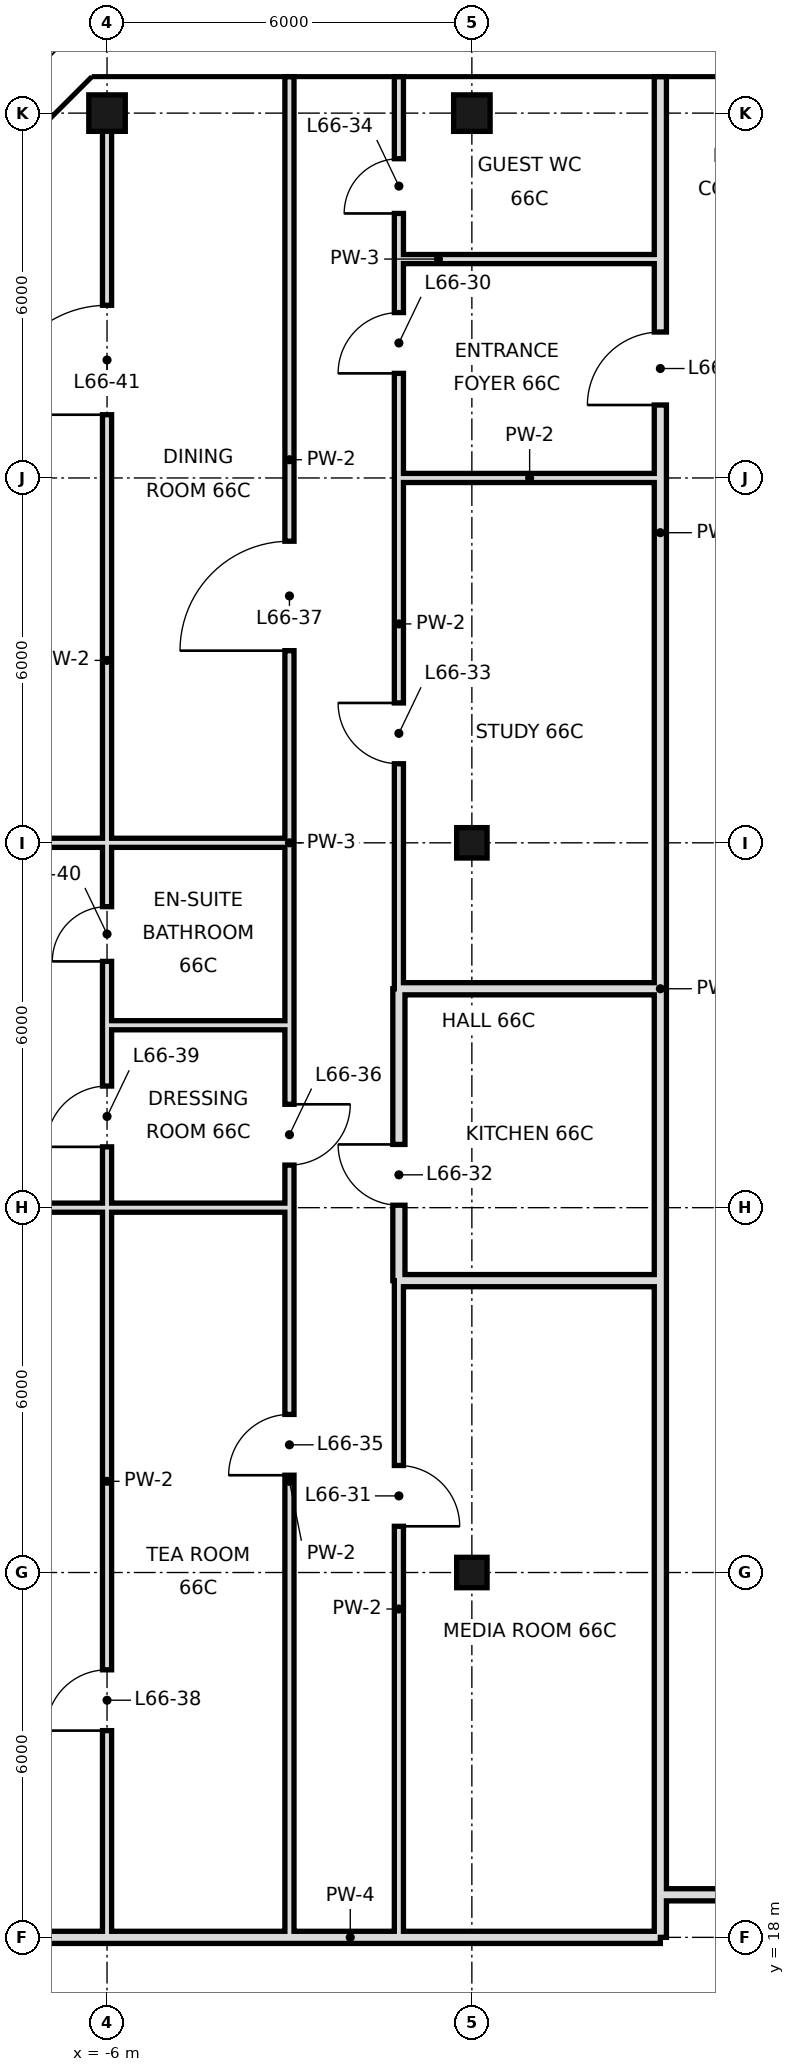
"""IFC4 building model, lengths in metres.
Left out: names, types, materials, properties, quantities, classifications, styles, units other than length and angle.
Written with IfcOpenShell. Run it as: python <this file> out.ifc"""

import sys

from ifc_helpers import new_model, si_unit, direction, frame, frame_2d, origin, origin_2d, place, context, subcontext, project, spatial, rectangle, hollow_rectangle, extrude, element, fill, save


model = new_model("IFC4")
c1 = context("Model", 3, precision=1e-05, world=origin(), true_north=direction((0.0, 1.0)))
c2 = subcontext(c1, "Body", "Model", "MODEL_VIEW")
j1 = project(units=[si_unit("LENGTHUNIT", "METRE"), si_unit("PLANEANGLEUNIT", "RADIAN")], contexts=[c1])
p1 = place(None, origin())
s1 = spatial("IfcSite", under=j1, at=p1, CompositionType="ELEMENT")
p2 = place(p1, origin())
s2 = spatial("IfcBuilding", under=s1, at=p2, CompositionType="ELEMENT")
p3 = place(p2, frame((0.0, 0.0, 277.4)))
s3 = spatial("IfcBuildingStorey", under=s2, at=p3, CompositionType="ELEMENT", Elevation=277.4)
p4 = place(p3, frame((-6.0, 48.0, 0.0), z_axis=(0.0, 0.0, 1.0), x_axis=(1.0, 0.0, 0.0)))
e1 = element("IfcColumn", 1, at=p4, inside=s3, PredefinedType="COLUMN", context=c2, shape_type="SweptSolid", body=[
    extrude(hollow_rectangle(XDim=0.6, YDim=0.6, WallThickness=0.028, at=origin_2d()), origin(), (0.0, 0.0, 1.0), 4.4),
])
for number, where, z_axis, x_axis in (
    (2, (0.0, 24.0, 0.0), (0.0, 0.0, 1.0), (1.0, 0.0, 0.0)),
    (3, (0.0, 36.0, 0.0), (0.0, 0.0, 1.0), (1.0, 0.0, 0.0)),
):
    element("IfcColumn", number, at=place(p3, frame(where, z_axis=z_axis, x_axis=x_axis)), inside=s3, PredefinedType="COLUMN", context=c2, shape_type="SweptSolid", body=[
        extrude(hollow_rectangle(XDim=0.5, YDim=0.5, WallThickness=0.025, at=origin_2d()), origin(), (0.0, 0.0, 1.0), 4.4),
    ])
p5 = place(p3, frame((0.0, 48.0, 0.0), z_axis=(0.0, 0.0, 1.0), x_axis=(1.0, 0.0, 0.0)))
e4 = element("IfcColumn", 4, at=p5, inside=s3, PredefinedType="COLUMN", context=c2, shape_type="SweptSolid", body=[
    extrude(hollow_rectangle(XDim=0.6, YDim=0.6, WallThickness=0.028, at=origin_2d()), origin(), (0.0, 0.0, 1.0), 4.4),
])
p6 = place(p3, frame((-1.2, 28.8, 0.0), z_axis=(0.0, 0.0, 1.0), x_axis=(0.0, 1.0, 0.0)))
e5 = element("IfcWall", 5, at=p6, inside=s3, PredefinedType="SOLIDWALL", context=c2, shape_type="SweptSolid", body=[
    extrude(rectangle(XDim=4.8, YDim=0.2, at=frame_2d((2.4, 0.0))), origin(), (0.0, 0.0, 1.0), 3.4),
])
p7 = place(p6, frame((1.24, 0.0, 0.0)))
e6 = element("IfcOpeningElement", 6, at=p7, cuts=e5, PredefinedType="OPENING", context=c2, shape_type="SweptSolid", body=[
    extrude(rectangle(XDim=1.0, YDim=2.4, at=frame_2d((0.5, 1.2))), frame((0.0, 0.11, 0.0), z_axis=(0.0, -1.0, 0.0), x_axis=(1.0, 0.0, 0.0)), (0.0, 0.0, 1.0), 0.22),
])
p8 = place(p3, frame((-1.2, 18.0, 0.0), z_axis=(0.0, 0.0, 1.0), x_axis=(0.0, 1.0, 0.0)))
e7 = element("IfcWall", 7, at=p8, inside=s3, PredefinedType="PARTITIONING", context=c2, shape_type="SweptSolid", body=[
    extrude(rectangle(XDim=10.8, YDim=0.15, at=frame_2d((5.4, 0.0))), origin(), (0.0, 0.0, 1.0), 4.1),
])
p9 = place(p8, frame((6.76, 0.0, 0.0)))
e8 = element("IfcOpeningElement", 8, at=p9, cuts=e7, PredefinedType="OPENING", context=c2, shape_type="SweptSolid", body=[
    extrude(rectangle(XDim=1.0, YDim=2.4, at=frame_2d((0.5, 1.2))), frame((0.0, 0.085, 0.0), z_axis=(0.0, -1.0, 0.0), x_axis=(1.0, 0.0, 0.0)), (0.0, 0.0, 1.0), 0.17),
])
p10 = place(p3, frame((-1.2, 33.6, 0.0), z_axis=(0.0, 0.0, 1.0), x_axis=(0.0, 1.0, 0.0)))
e9 = element("IfcWall", 9, at=p10, inside=s3, PredefinedType="PARTITIONING", context=c2, shape_type="SweptSolid", body=[
    extrude(rectangle(XDim=12.0, YDim=0.15, at=frame_2d((6.0, 0.0))), origin(), (0.0, 0.0, 1.0), 4.1),
])
p11 = place(p10, frame((10.12, 0.0, 0.0)))
e10 = element("IfcOpeningElement", 10, at=p11, cuts=e9, PredefinedType="OPENING", context=c2, shape_type="SweptSolid", body=[
    extrude(rectangle(XDim=1.0, YDim=2.4, at=frame_2d((0.5, 1.2))), frame((0.0, 0.085, 0.0), z_axis=(0.0, -1.0, 0.0), x_axis=(1.0, 0.0, 0.0)), (0.0, 0.0, 1.0), 0.17),
])
p12 = place(p10, frame((3.7, 0.0, 0.0)))
e11 = element("IfcOpeningElement", 11, at=p12, cuts=e9, PredefinedType="OPENING", context=c2, shape_type="SweptSolid", body=[
    extrude(rectangle(XDim=1.0, YDim=2.4, at=frame_2d((0.5, 1.2))), frame((0.0, 0.085, 0.0), z_axis=(0.0, -1.0, 0.0), x_axis=(1.0, 0.0, 0.0)), (0.0, 0.0, 1.0), 0.17),
])
p13 = place(p3, frame((-1.2, 45.6, 0.0), z_axis=(0.0, 0.0, 1.0), x_axis=(0.0, 1.0, 0.0)))
e12 = element("IfcWall", 12, at=p13, inside=s3, PredefinedType="PARTITIONING", context=c2, shape_type="SweptSolid", body=[
    extrude(rectangle(XDim=3.0, YDim=0.15, at=frame_2d((1.5, 0.0))), origin(), (0.0, 0.0, 1.0), 4.1),
])
p14 = place(p13, frame((0.75, 0.0, 0.0)))
e13 = element("IfcOpeningElement", 13, at=p14, cuts=e12, PredefinedType="OPENING", context=c2, shape_type="SweptSolid", body=[
    extrude(rectangle(XDim=0.9, YDim=2.4, at=frame_2d((0.45, 1.2))), frame((0.0, 0.085, 0.0), z_axis=(0.0, -1.0, 0.0), x_axis=(1.0, 0.0, 0.0)), (0.0, 0.0, 1.0), 0.17),
])
p15 = place(p3, frame((-3.0, 18.0, 0.0), z_axis=(0.0, 0.0, 1.0), x_axis=(0.0, 1.0, 0.0)))
e14 = element("IfcWall", 14, at=p15, inside=s3, PredefinedType="PARTITIONING", context=c2, shape_type="SweptSolid", body=[
    extrude(rectangle(XDim=15.0, YDim=0.15, at=frame_2d((7.5, 0.0))), origin(), (0.0, 0.0, 1.0), 4.1),
])
p16 = place(p15, frame((7.6, 0.0, 0.0)))
e15 = element("IfcOpeningElement", 15, at=p16, cuts=e14, PredefinedType="OPENING", context=c2, shape_type="SweptSolid", body=[
    extrude(rectangle(XDim=1.0, YDim=2.4, at=frame_2d((0.5, 1.2))), frame((0.0, 0.085, 0.0), z_axis=(0.0, -1.0, 0.0), x_axis=(1.0, 0.0, 0.0)), (0.0, 0.0, 1.0), 0.17),
])
p17 = place(p15, frame((12.7, 0.0, 0.0)))
e16 = element("IfcOpeningElement", 16, at=p17, cuts=e14, PredefinedType="OPENING", context=c2, shape_type="SweptSolid", body=[
    extrude(rectangle(XDim=1.0, YDim=2.4, at=frame_2d((0.5, 1.2))), frame((0.0, 0.085, 0.0), z_axis=(0.0, -1.0, 0.0), x_axis=(1.0, 0.0, 0.0)), (0.0, 0.0, 1.0), 0.17),
])
p18 = place(p3, frame((-3.0, 36.0, 0.0), z_axis=(0.0, 0.0, 1.0), x_axis=(0.0, 1.0, 0.0)))
e17 = element("IfcWall", 17, at=p18, inside=s3, PredefinedType="PARTITIONING", context=c2, shape_type="SweptSolid", body=[
    extrude(rectangle(XDim=12.6, YDim=0.15, at=frame_2d((6.3, 0.0))), origin(), (0.0, 0.0, 1.0), 4.1),
])
p19 = place(p18, frame((3.16, 0.0, 0.0)))
e18 = element("IfcOpeningElement", 18, at=p19, cuts=e17, PredefinedType="OPENING", context=c2, shape_type="SweptSolid", body=[
    extrude(rectangle(XDim=1.8, YDim=2.4, at=frame_2d((0.9, 1.2))), frame((0.0, 0.085, 0.0), z_axis=(0.0, -1.0, 0.0), x_axis=(1.0, 0.0, 0.0)), (0.0, 0.0, 1.0), 0.17),
])
p20 = place(p3, frame((-3.0, 33.0, 0.0), z_axis=(0.0, 0.0, 1.0), x_axis=(0.0, 1.0, 0.0)))
e19 = element("IfcWall", 19, at=p20, inside=s3, PredefinedType="PARTITIONING", context=c2, shape_type="SweptSolid", body=[
    extrude(rectangle(XDim=3.0, YDim=0.15, at=frame_2d((1.5, 0.0))), origin(), (0.0, 0.0, 1.0), 4.1),
])
p21 = place(p3, frame((-6.0, 18.0, 0.0), z_axis=(0.0, 0.0, 1.0), x_axis=(0.0, 1.0, 0.0)))
e20 = element("IfcWall", 20, at=p21, inside=s3, PredefinedType="PARTITIONING", context=c2, shape_type="SweptSolid", body=[
    extrude(rectangle(XDim=15.0, YDim=0.15, at=frame_2d((7.5, 0.0))), origin(), (0.0, 0.0, 1.0), 4.1),
])
p22 = place(p21, frame((3.4, 0.0, 0.0)))
e21 = element("IfcOpeningElement", 21, at=p22, cuts=e20, PredefinedType="OPENING", context=c2, shape_type="SweptSolid", body=[
    extrude(rectangle(XDim=1.0, YDim=2.4, at=frame_2d((0.5, 1.2))), frame((0.0, 0.085, 0.0), z_axis=(0.0, -1.0, 0.0), x_axis=(1.0, 0.0, 0.0)), (0.0, 0.0, 1.0), 0.17),
])
p23 = place(p21, frame((13.0, 0.0, 0.0)))
e22 = element("IfcOpeningElement", 22, at=p23, cuts=e20, PredefinedType="OPENING", context=c2, shape_type="SweptSolid", body=[
    extrude(rectangle(XDim=1.0, YDim=2.4, at=frame_2d((0.5, 1.2))), frame((0.0, 0.085, 0.0), z_axis=(0.0, -1.0, 0.0), x_axis=(1.0, 0.0, 0.0)), (0.0, 0.0, 1.0), 0.17),
])
p24 = place(p3, frame((-6.0, 36.0, 0.0), z_axis=(0.0, 0.0, 1.0), x_axis=(0.0, 1.0, 0.0)))
e23 = element("IfcWall", 23, at=p24, inside=s3, PredefinedType="PARTITIONING", context=c2, shape_type="SweptSolid", body=[
    extrude(rectangle(XDim=12.0, YDim=0.15, at=frame_2d((6.0, 0.0))), origin(), (0.0, 0.0, 1.0), 4.1),
])
p25 = place(p24, frame((7.04, 0.0, 0.0)))
e24 = element("IfcOpeningElement", 24, at=p25, cuts=e23, PredefinedType="OPENING", context=c2, shape_type="SweptSolid", body=[
    extrude(rectangle(XDim=1.8, YDim=2.4, at=frame_2d((0.9, 1.2))), frame((0.0, 0.085, 0.0), z_axis=(0.0, -1.0, 0.0), x_axis=(1.0, 0.0, 0.0)), (0.0, 0.0, 1.0), 0.17),
])
p26 = place(p3, frame((-6.0, 33.0, 0.0), z_axis=(0.0, 0.0, 1.0), x_axis=(0.0, 1.0, 0.0)))
e25 = element("IfcWall", 25, at=p26, inside=s3, PredefinedType="PARTITIONING", context=c2, shape_type="SweptSolid", body=[
    extrude(rectangle(XDim=3.0, YDim=0.15, at=frame_2d((1.5, 0.0))), origin(), (0.0, 0.0, 1.0), 4.1),
])
p27 = place(p26, frame((1.05, 0.0, 0.0)))
e26 = element("IfcOpeningElement", 26, at=p27, cuts=e25, PredefinedType="OPENING", context=c2, shape_type="SweptSolid", body=[
    extrude(rectangle(XDim=0.9, YDim=2.4, at=frame_2d((0.45, 1.2))), frame((0.0, 0.085, 0.0), z_axis=(0.0, -1.0, 0.0), x_axis=(1.0, 0.0, 0.0)), (0.0, 0.0, 1.0), 0.17),
])
p28 = place(p3, frame((3.1, 18.7, 0.0), z_axis=(0.0, 0.0, 1.0), x_axis=(0.0, 1.0, 0.0)))
e27 = element("IfcWall", 27, at=p28, inside=s3, PredefinedType="SOLIDWALL", context=c2, shape_type="SweptSolid", body=[
    extrude(rectangle(XDim=10.1, YDim=0.2, at=frame_2d((5.05, 0.0))), origin(), (0.0, 0.0, 1.0), 4.1),
])
p29 = place(p3, frame((3.1, 33.6, 0.0), z_axis=(0.0, 0.0, 1.0), x_axis=(0.0, 1.0, 0.0)))
e28 = element("IfcWall", 28, at=p29, inside=s3, PredefinedType="SOLIDWALL", context=c2, shape_type="SweptSolid", body=[
    extrude(rectangle(XDim=15.0, YDim=0.2, at=frame_2d((7.5, 0.0))), origin(), (0.0, 0.0, 1.0), 3.4),
])
p30 = place(p29, frame((9.6, 0.0, 0.0)))
e29 = element("IfcOpeningElement", 29, at=p30, cuts=e28, PredefinedType="OPENING", context=c2, shape_type="SweptSolid", body=[
    extrude(rectangle(XDim=1.2, YDim=2.4, at=frame_2d((0.6, 1.2))), frame((0.0, 0.11, 0.0), z_axis=(0.0, -1.0, 0.0), x_axis=(1.0, 0.0, 0.0)), (0.0, 0.0, 1.0), 0.22),
])
p31 = place(p3, frame((3.1, 28.8, 0.0), z_axis=(0.0, 0.0, 1.0), x_axis=(0.0, 1.0, 0.0)))
e30 = element("IfcWall", 30, at=p31, inside=s3, PredefinedType="SOLIDWALL", context=c2, shape_type="SweptSolid", body=[
    extrude(rectangle(XDim=4.8, YDim=0.2, at=frame_2d((2.4, 0.0))), origin(), (0.0, 0.0, 1.0), 3.65),
])
p32 = place(p3, frame((3.1, 18.0, 0.0), z_axis=(0.0, 0.0, 1.0), x_axis=(0.0, 1.0, 0.0)))
e31 = element("IfcWall", 31, at=p32, inside=s3, PredefinedType="SOLIDWALL", context=c2, shape_type="SweptSolid", body=[
    extrude(rectangle(XDim=0.7, YDim=0.2, at=frame_2d((0.35, 0.0))), origin(), (0.0, 0.0, 1.0), 3.65),
])
p33 = place(p3, frame((-7.8, 18.0, 0.0), z_axis=(0.0, 0.0, 1.0), x_axis=(1.0, 0.0, 0.0)))
e32 = element("IfcWall", 32, at=p33, inside=s3, PredefinedType="SOLIDWALL", context=c2, shape_type="SweptSolid", body=[
    extrude(rectangle(XDim=10.9, YDim=0.2, at=frame_2d((5.45, 0.0))), origin(), (0.0, 0.0, 1.0), 3.4),
])
p34 = place(p3, frame((3.1, 18.7, 0.0), z_axis=(0.0, 0.0, 1.0), x_axis=(1.0, 0.0, 0.0)))
e33 = element("IfcWall", 33, at=p34, inside=s3, PredefinedType="SOLIDWALL", context=c2, shape_type="SweptSolid", body=[
    extrude(rectangle(XDim=17.3, YDim=0.2, at=frame_2d((8.65, 0.0))), origin(), (0.0, 0.0, 1.0), 3.4),
])
p35 = place(p34, frame((12.16, 0.0, 0.0)))
e34 = element("IfcOpeningElement", 34, at=p35, cuts=e33, PredefinedType="OPENING", context=c2, shape_type="SweptSolid", body=[
    extrude(rectangle(XDim=1.2, YDim=2.4, at=frame_2d((0.6, 1.2))), frame((0.0, 0.11, 0.0), z_axis=(0.0, -1.0, 0.0), x_axis=(1.0, 0.0, 0.0)), (0.0, 0.0, 1.0), 0.22),
])
p36 = place(p3, frame((-1.2, 28.8, 0.0), z_axis=(0.0, 0.0, 1.0), x_axis=(1.0, 0.0, 0.0)))
e35 = element("IfcWall", 35, at=p36, inside=s3, PredefinedType="SOLIDWALL", context=c2, shape_type="SweptSolid", body=[
    extrude(rectangle(XDim=4.3, YDim=0.2, at=frame_2d((2.15, 0.0))), origin(), (0.0, 0.0, 1.0), 3.4),
])
p37 = place(p3, frame((-12.6, 30.0, 0.0), z_axis=(0.0, 0.0, 1.0), x_axis=(1.0, 0.0, 0.0)))
e36 = element("IfcWall", 36, at=p37, inside=s3, PredefinedType="PARTITIONING", context=c2, shape_type="SweptSolid", body=[
    extrude(rectangle(XDim=9.6, YDim=0.15, at=frame_2d((4.8, 0.0))), origin(), (0.0, 0.0, 1.0), 3.4),
])
p38 = place(p3, frame((-6.0, 33.0, 0.0), z_axis=(0.0, 0.0, 1.0), x_axis=(1.0, 0.0, 0.0)))
e37 = element("IfcWall", 37, at=p38, inside=s3, PredefinedType="PARTITIONING", context=c2, shape_type="SweptSolid", body=[
    extrude(rectangle(XDim=3.0, YDim=0.15, at=frame_2d((1.5, 0.0))), origin(), (0.0, 0.0, 1.0), 4.1),
])
p39 = place(p3, frame((-1.2, 33.6, 0.0), z_axis=(0.0, 0.0, 1.0), x_axis=(1.0, 0.0, 0.0)))
e38 = element("IfcWall", 38, at=p39, inside=s3, PredefinedType="SOLIDWALL", context=c2, shape_type="SweptSolid", body=[
    extrude(rectangle(XDim=4.3, YDim=0.2, at=frame_2d((2.15, 0.0))), origin(), (0.0, 0.0, 1.0), 3.4),
])
p40 = place(p3, frame((-12.0, 36.0, 0.0), z_axis=(0.0, 0.0, 1.0), x_axis=(1.0, 0.0, 0.0)))
e39 = element("IfcWall", 39, at=p40, inside=s3, PredefinedType="PARTITIONING", context=c2, shape_type="SweptSolid", body=[
    extrude(rectangle(XDim=6.0, YDim=0.15, at=frame_2d((3.0, 0.0))), origin(), (0.0, 0.0, 1.0), 3.4),
])
p41 = place(p3, frame((-6.0, 36.0, 0.0), z_axis=(0.0, 0.0, 1.0), x_axis=(1.0, 0.0, 0.0)))
e40 = element("IfcWall", 40, at=p41, inside=s3, PredefinedType="PARTITIONING", context=c2, shape_type="SweptSolid", body=[
    extrude(rectangle(XDim=3.0, YDim=0.15, at=frame_2d((1.5, 0.0))), origin(), (0.0, 0.0, 1.0), 3.4),
])
p42 = place(p3, frame((-1.2, 42.0, 0.0), z_axis=(0.0, 0.0, 1.0), x_axis=(1.0, 0.0, 0.0)))
e41 = element("IfcWall", 41, at=p42, inside=s3, PredefinedType="PARTITIONING", context=c2, shape_type="SweptSolid", body=[
    extrude(rectangle(XDim=4.3, YDim=0.15, at=frame_2d((2.15, 0.0))), origin(), (0.0, 0.0, 1.0), 3.4),
])
p43 = place(p3, frame((-1.2, 45.6, 0.0), z_axis=(0.0, 0.0, 1.0), x_axis=(1.0, 0.0, 0.0)))
e42 = element("IfcWall", 42, at=p43, inside=s3, PredefinedType="PARTITIONING", context=c2, shape_type="SweptSolid", body=[
    extrude(rectangle(XDim=4.3, YDim=0.15, at=frame_2d((2.15, 0.0))), origin(), (0.0, 0.0, 1.0), 4.1),
])
p44 = place(p11, origin())
e43 = element("IfcDoor", 43, at=p44, inside=s3, OperationType="SINGLE_SWING_LEFT", PredefinedType="DOOR", context=c2, shape_type="SweptSolid", body=[
    extrude(rectangle(XDim=1.0, YDim=2.4, at=frame_2d((0.5, 1.2))), frame((0.0, 0.025, 0.0), z_axis=(0.0, -1.0, 0.0), x_axis=(1.0, 0.0, 0.0)), (0.0, 0.0, 1.0), 0.05),
])
fill(e10, e43)
p45 = place(p9, frame((1.0, 0.0, 0.0), z_axis=(0.0, 0.0, 1.0), x_axis=(-1.0, 0.0, 0.0)))
e44 = element("IfcDoor", 44, at=p45, inside=s3, OperationType="SINGLE_SWING_RIGHT", PredefinedType="DOOR", context=c2, shape_type="SweptSolid", body=[
    extrude(rectangle(XDim=1.0, YDim=2.4, at=frame_2d((0.5, 1.2))), frame((0.0, 0.025, 0.0), z_axis=(0.0, -1.0, 0.0), x_axis=(1.0, 0.0, 0.0)), (0.0, 0.0, 1.0), 0.05),
])
fill(e8, e44)
p46 = place(p7, frame((1.0, 0.0, 0.0), z_axis=(0.0, 0.0, 1.0), x_axis=(-1.0, 0.0, 0.0)))
e45 = element("IfcDoor", 45, at=p46, inside=s3, OperationType="SINGLE_SWING_LEFT", PredefinedType="DOOR", context=c2, shape_type="SweptSolid", body=[
    extrude(rectangle(XDim=1.0, YDim=2.4, at=frame_2d((0.5, 1.2))), frame((0.0, 0.025, 0.0), z_axis=(0.0, -1.0, 0.0), x_axis=(1.0, 0.0, 0.0)), (0.0, 0.0, 1.0), 0.05),
])
fill(e6, e45)
p47 = place(p12, frame((1.0, 0.0, 0.0), z_axis=(0.0, 0.0, 1.0), x_axis=(-1.0, 0.0, 0.0)))
e46 = element("IfcDoor", 46, at=p47, inside=s3, OperationType="SINGLE_SWING_LEFT", PredefinedType="DOOR", context=c2, shape_type="SweptSolid", body=[
    extrude(rectangle(XDim=1.0, YDim=2.4, at=frame_2d((0.5, 1.2))), frame((0.0, 0.025, 0.0), z_axis=(0.0, -1.0, 0.0), x_axis=(1.0, 0.0, 0.0)), (0.0, 0.0, 1.0), 0.05),
])
fill(e11, e46)
p48 = place(p14, origin())
e47 = element("IfcDoor", 47, at=p48, inside=s3, OperationType="SINGLE_SWING_LEFT", PredefinedType="DOOR", context=c2, shape_type="SweptSolid", body=[
    extrude(rectangle(XDim=0.9, YDim=2.4, at=frame_2d((0.45, 1.2))), frame((0.0, 0.025, 0.0), z_axis=(0.0, -1.0, 0.0), x_axis=(1.0, 0.0, 0.0)), (0.0, 0.0, 1.0), 0.05),
])
fill(e13, e47)
p49 = place(p16, origin())
e48 = element("IfcDoor", 48, at=p49, inside=s3, OperationType="SINGLE_SWING_LEFT", PredefinedType="DOOR", context=c2, shape_type="SweptSolid", body=[
    extrude(rectangle(XDim=1.0, YDim=2.4, at=frame_2d((0.5, 1.2))), frame((0.0, 0.025, 0.0), z_axis=(0.0, -1.0, 0.0), x_axis=(1.0, 0.0, 0.0)), (0.0, 0.0, 1.0), 0.05),
])
fill(e15, e48)
p50 = place(p17, origin())
e49 = element("IfcDoor", 49, at=p50, inside=s3, OperationType="SINGLE_SWING_RIGHT", PredefinedType="DOOR", context=c2, shape_type="SweptSolid", body=[
    extrude(rectangle(XDim=1.0, YDim=2.4, at=frame_2d((0.5, 1.2))), frame((0.0, 0.025, 0.0), z_axis=(0.0, -1.0, 0.0), x_axis=(1.0, 0.0, 0.0)), (0.0, 0.0, 1.0), 0.05),
])
fill(e16, e49)
p51 = place(p19, origin())
e50 = element("IfcDoor", 50, at=p51, inside=s3, OperationType="SINGLE_SWING_LEFT", PredefinedType="DOOR", context=c2, shape_type="SweptSolid", body=[
    extrude(rectangle(XDim=1.8, YDim=2.4, at=frame_2d((0.9, 1.2))), frame((0.0, 0.025, 0.0), z_axis=(0.0, -1.0, 0.0), x_axis=(1.0, 0.0, 0.0)), (0.0, 0.0, 1.0), 0.05),
])
fill(e18, e50)
p52 = place(p22, origin())
e51 = element("IfcDoor", 51, at=p52, inside=s3, OperationType="SINGLE_SWING_LEFT", PredefinedType="DOOR", context=c2, shape_type="SweptSolid", body=[
    extrude(rectangle(XDim=1.0, YDim=2.4, at=frame_2d((0.5, 1.2))), frame((0.0, 0.025, 0.0), z_axis=(0.0, -1.0, 0.0), x_axis=(1.0, 0.0, 0.0)), (0.0, 0.0, 1.0), 0.05),
])
fill(e21, e51)
p53 = place(p23, origin())
e52 = element("IfcDoor", 52, at=p53, inside=s3, OperationType="SINGLE_SWING_LEFT", PredefinedType="DOOR", context=c2, shape_type="SweptSolid", body=[
    extrude(rectangle(XDim=1.0, YDim=2.4, at=frame_2d((0.5, 1.2))), frame((0.0, 0.025, 0.0), z_axis=(0.0, -1.0, 0.0), x_axis=(1.0, 0.0, 0.0)), (0.0, 0.0, 1.0), 0.05),
])
fill(e22, e52)
p54 = place(p27, origin())
e53 = element("IfcDoor", 53, at=p54, inside=s3, OperationType="SINGLE_SWING_LEFT", PredefinedType="DOOR", context=c2, shape_type="SweptSolid", body=[
    extrude(rectangle(XDim=0.9, YDim=2.4, at=frame_2d((0.45, 1.2))), frame((0.0, 0.025, 0.0), z_axis=(0.0, -1.0, 0.0), x_axis=(1.0, 0.0, 0.0)), (0.0, 0.0, 1.0), 0.05),
])
fill(e26, e53)
p55 = place(p25, origin())
e54 = element("IfcDoor", 54, at=p55, inside=s3, OperationType="SINGLE_SWING_LEFT", PredefinedType="DOOR", context=c2, shape_type="SweptSolid", body=[
    extrude(rectangle(XDim=1.8, YDim=2.4, at=frame_2d((0.9, 1.2))), frame((0.0, 0.025, 0.0), z_axis=(0.0, -1.0, 0.0), x_axis=(1.0, 0.0, 0.0)), (0.0, 0.0, 1.0), 0.05),
])
fill(e24, e54)
p56 = place(p30, origin())
e55 = element("IfcDoor", 55, at=p56, inside=s3, OperationType="SINGLE_SWING_LEFT", PredefinedType="DOOR", context=c2, shape_type="SweptSolid", body=[
    extrude(rectangle(XDim=1.2, YDim=2.4, at=frame_2d((0.6, 1.2))), frame((0.0, 0.025, 0.0), z_axis=(0.0, -1.0, 0.0), x_axis=(1.0, 0.0, 0.0)), (0.0, 0.0, 1.0), 0.05),
])
fill(e29, e55)
save(model, sys.argv[1])
